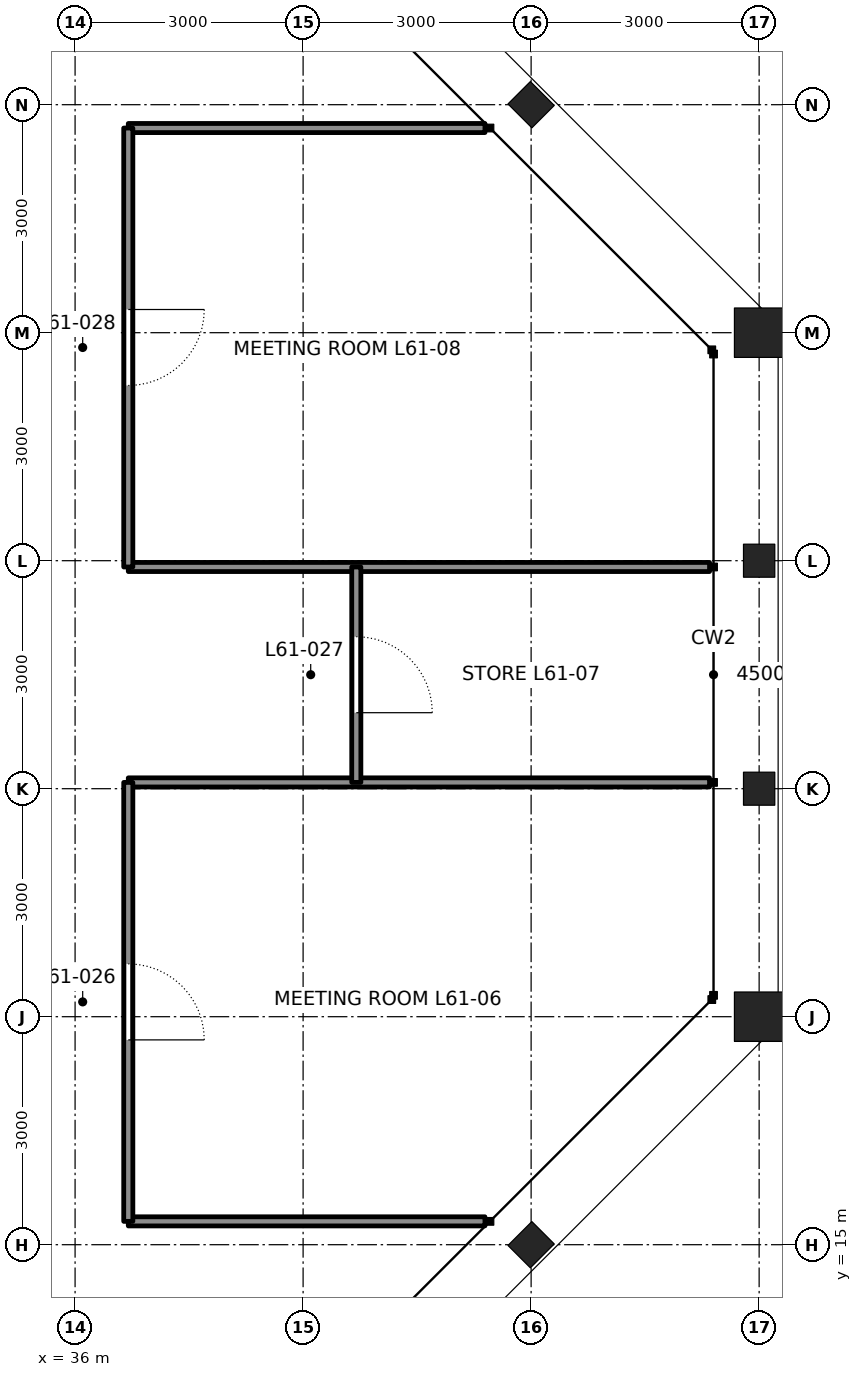
"""IFC4 building model, lengths in metres.
Left out: names, types, materials, properties, quantities, classifications, styles, units other than length and angle.
Written with IfcOpenShell. Run it as: python <this file> out.ifc"""

import sys

from ifc_helpers import new_model, si_unit, direction, frame, frame_2d, origin, origin_2d, place, context, subcontext, project, spatial, rectangle, hollow_rectangle, i_section, extrude, element, fill, save


model = new_model("IFC4")
c1 = context("Model", 3, precision=1e-05, world=origin(), true_north=direction((0.0, 1.0)))
c2 = subcontext(c1, "Body", "Model", "MODEL_VIEW")
j1 = project(units=[si_unit("LENGTHUNIT", "METRE"), si_unit("PLANEANGLEUNIT", "RADIAN")], contexts=[c1])
p1 = place(None, origin())
s1 = spatial("IfcSite", under=j1, at=p1, CompositionType="ELEMENT")
p2 = place(p1, origin())
s2 = spatial("IfcBuilding", under=s1, at=p2, CompositionType="ELEMENT")
p3 = place(p2, frame((0.0, 0.0, 274.8)))
s3 = spatial("IfcBuildingStorey", under=s2, at=p3, CompositionType="ELEMENT", Elevation=274.8)
p4 = place(p3, frame((42.0, 15.0, 0.0), z_axis=(0.0, 0.0, 1.0), x_axis=(0.707106781187, -0.707106781187, 0.0)))
e1 = element("IfcColumn", 1, at=p4, inside=s3, PredefinedType="COLUMN", context=c2, shape_type="SweptSolid", body=[
    extrude(i_section(OverallWidth=0.417, OverallDepth=0.445, WebThickness=0.039, FlangeThickness=0.063, at=origin_2d()), origin(), (0.0, 0.0, 1.0), 4.2),
])
p5 = place(p3, frame((45.0, 18.0, 0.0), z_axis=(0.0, 0.0, 1.0), x_axis=(1.0, 0.0, 0.0)))
e2 = element("IfcColumn", 2, at=p5, inside=s3, PredefinedType="COLUMN", context=c2, shape_type="SweptSolid", body=[
    extrude(hollow_rectangle(XDim=0.65, YDim=0.65, WallThickness=0.065, at=origin_2d()), origin(), (0.0, 0.0, 1.0), 4.2),
])
for number, where, z_axis, x_axis in (
    (3, (45.0, 21.0, 0.0), (0.0, 0.0, 1.0), (1.0, 0.0, 0.0)),
    (4, (45.0, 24.0, 0.0), (0.0, 0.0, 1.0), (1.0, 0.0, 0.0)),
):
    element("IfcColumn", number, at=place(p3, frame(where, z_axis=z_axis, x_axis=x_axis)), inside=s3, PredefinedType="COLUMN", context=c2, shape_type="SweptSolid", body=[
        extrude(i_section(OverallWidth=0.411, OverallDepth=0.434, WebThickness=0.036, FlangeThickness=0.057, at=origin_2d()), origin(), (0.0, 0.0, 1.0), 4.2),
    ])
p6 = place(p3, frame((45.0, 27.0, 0.0), z_axis=(0.0, 0.0, 1.0), x_axis=(1.0, 0.0, 0.0)))
e5 = element("IfcColumn", 5, at=p6, inside=s3, PredefinedType="COLUMN", context=c2, shape_type="SweptSolid", body=[
    extrude(hollow_rectangle(XDim=0.65, YDim=0.65, WallThickness=0.065, at=origin_2d()), origin(), (0.0, 0.0, 1.0), 4.2),
])
p7 = place(p3, frame((42.0, 30.0, 0.0), z_axis=(0.0, 0.0, 1.0), x_axis=(0.707106781187, 0.707106781187, 0.0)))
e6 = element("IfcColumn", 6, at=p7, inside=s3, PredefinedType="COLUMN", context=c2, shape_type="SweptSolid", body=[
    extrude(i_section(OverallWidth=0.417, OverallDepth=0.445, WebThickness=0.039, FlangeThickness=0.063, at=origin_2d()), origin(), (0.0, 0.0, 1.0), 4.2),
])
p8 = place(p3, frame((41.393, 15.307, 0.0), z_axis=(0.0, 0.0, 1.0), x_axis=(-1.0, 0.0, 0.0)))
e7 = element("IfcWall", 7, at=p8, inside=s3, PredefinedType="PARTITIONING", context=c2, shape_type="SweptSolid", body=[
    extrude(rectangle(XDim=4.693, YDim=0.12, at=frame_2d((2.346, 0.0))), origin(), (0.0, 0.0, 1.0), 4.04),
])
for number, where, z_axis, x_axis in (
    (8, (44.347, 21.083, 0.0), (0.0, 0.0, 1.0), (-1.0, 0.0, 0.0)),
    (9, (44.347, 23.917, 0.0), (0.0, 0.0, 1.0), (-1.0, 0.0, 0.0)),
):
    element("IfcWall", number, at=place(p3, frame(where, z_axis=z_axis, x_axis=x_axis)), inside=s3, PredefinedType="PARTITIONING", context=c2, shape_type="SweptSolid", body=[
        extrude(rectangle(XDim=7.647, YDim=0.12, at=frame_2d((3.824, 0.0))), origin(), (0.0, 0.0, 1.0), 3.357),
    ])
p9 = place(p3, frame((41.393, 29.693, 0.0), z_axis=(0.0, 0.0, 1.0), x_axis=(-1.0, 0.0, 0.0)))
e10 = element("IfcWall", 10, at=p9, inside=s3, PredefinedType="PARTITIONING", context=c2, shape_type="SweptSolid", body=[
    extrude(rectangle(XDim=4.693, YDim=0.12, at=frame_2d((2.346, 0.0))), origin(), (0.0, 0.0, 1.0), 4.04),
])
p10 = place(p3, frame((36.7, 15.307, 0.0), z_axis=(0.0, 0.0, 1.0), x_axis=(0.0, 1.0, 0.0)))
e11 = element("IfcWall", 11, at=p10, inside=s3, PredefinedType="PARTITIONING", context=c2, shape_type="SweptSolid", body=[
    extrude(rectangle(XDim=5.776, YDim=0.12, at=frame_2d((2.888, 0.0))), origin(), (0.0, 0.0, 1.0), 4.04),
])
p11 = place(p10, frame((2.388, 0.0, 0.0)))
e12 = element("IfcOpeningElement", 12, at=p11, cuts=e11, PredefinedType="OPENING", context=c2, shape_type="SweptSolid", body=[
    extrude(rectangle(XDim=1.0, YDim=2.4, at=frame_2d((0.5, 1.2))), frame((0.0, 0.07, 0.0), z_axis=(0.0, -1.0, 0.0), x_axis=(1.0, 0.0, 0.0)), (0.0, 0.0, 1.0), 0.14),
])
p12 = place(p3, frame((39.7, 21.083, 0.0), z_axis=(0.0, 0.0, 1.0), x_axis=(0.0, 1.0, 0.0)))
e13 = element("IfcWall", 13, at=p12, inside=s3, PredefinedType="PARTITIONING", context=c2, shape_type="SweptSolid", body=[
    extrude(rectangle(XDim=2.834, YDim=0.12, at=frame_2d((1.417, 0.0))), origin(), (0.0, 0.0, 1.0), 4.04),
])
p13 = place(p12, frame((0.917, 0.0, 0.0)))
e14 = element("IfcOpeningElement", 14, at=p13, cuts=e13, PredefinedType="OPENING", context=c2, shape_type="SweptSolid", body=[
    extrude(rectangle(XDim=1.0, YDim=2.4, at=frame_2d((0.5, 1.2))), frame((0.0, 0.07, 0.0), z_axis=(0.0, -1.0, 0.0), x_axis=(1.0, 0.0, 0.0)), (0.0, 0.0, 1.0), 0.14),
])
p14 = place(p3, frame((36.7, 23.917, 0.0), z_axis=(0.0, 0.0, 1.0), x_axis=(0.0, 1.0, 0.0)))
e15 = element("IfcWall", 15, at=p14, inside=s3, PredefinedType="PARTITIONING", context=c2, shape_type="SweptSolid", body=[
    extrude(rectangle(XDim=5.776, YDim=0.12, at=frame_2d((2.888, 0.0))), origin(), (0.0, 0.0, 1.0), 4.04),
])
p15 = place(p14, frame((2.388, 0.0, 0.0)))
e16 = element("IfcOpeningElement", 16, at=p15, cuts=e15, PredefinedType="OPENING", context=c2, shape_type="SweptSolid", body=[
    extrude(rectangle(XDim=1.0, YDim=2.4, at=frame_2d((0.5, 1.2))), frame((0.0, 0.07, 0.0), z_axis=(0.0, -1.0, 0.0), x_axis=(1.0, 0.0, 0.0)), (0.0, 0.0, 1.0), 0.14),
])
p16 = place(p11, frame((1.0, 0.0, 0.0), z_axis=(0.0, 0.0, 1.0), x_axis=(-1.0, 0.0, 0.0)))
e17 = element("IfcDoor", 17, at=p16, inside=s3, OperationType="SINGLE_SWING_RIGHT", PredefinedType="DOOR", context=c2, shape_type="SweptSolid", body=[
    extrude(rectangle(XDim=1.0, YDim=2.4, at=frame_2d((0.5, 1.2))), frame((0.0, 0.025, 0.0), z_axis=(0.0, -1.0, 0.0), x_axis=(1.0, 0.0, 0.0)), (0.0, 0.0, 1.0), 0.05),
])
fill(e12, e17)
p17 = place(p13, frame((1.0, 0.0, 0.0), z_axis=(0.0, 0.0, 1.0), x_axis=(-1.0, 0.0, 0.0)))
e18 = element("IfcDoor", 18, at=p17, inside=s3, OperationType="SINGLE_SWING_RIGHT", PredefinedType="DOOR", context=c2, shape_type="SweptSolid", body=[
    extrude(rectangle(XDim=1.0, YDim=2.4, at=frame_2d((0.5, 1.2))), frame((0.0, 0.025, 0.0), z_axis=(0.0, -1.0, 0.0), x_axis=(1.0, 0.0, 0.0)), (0.0, 0.0, 1.0), 0.05),
])
fill(e14, e18)
p18 = place(p15, frame((1.0, 0.0, 0.0), z_axis=(0.0, 0.0, 1.0), x_axis=(-1.0, 0.0, 0.0)))
e19 = element("IfcDoor", 19, at=p18, inside=s3, OperationType="SINGLE_SWING_LEFT", PredefinedType="DOOR", context=c2, shape_type="SweptSolid", body=[
    extrude(rectangle(XDim=1.0, YDim=2.4, at=frame_2d((0.5, 1.2))), frame((0.0, 0.025, 0.0), z_axis=(0.0, -1.0, 0.0), x_axis=(1.0, 0.0, 0.0)), (0.0, 0.0, 1.0), 0.05),
])
fill(e16, e19)
save(model, sys.argv[1])
